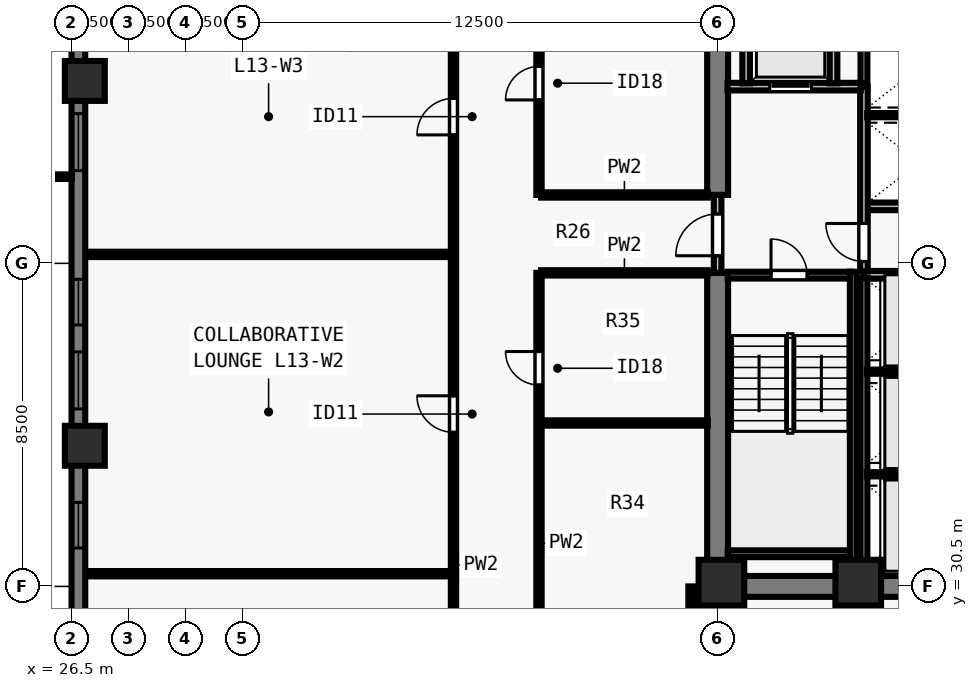
"""IFC4 building model, lengths in metres.
Left out: names, types, materials, properties, quantities, classifications, styles, units other than length and angle.
Written with IfcOpenShell. Run it as: python <this file> out.ifc"""

import sys

from ifc_helpers import new_model, si_unit, direction, frame, frame_2d, origin, origin_2d, place, context, subcontext, project, spatial, rectangle, extrude, element, fill, save


model = new_model("IFC4")
c1 = context("Model", 3, precision=1e-05, world=origin(), true_north=direction((0.0, 1.0)))
c2 = subcontext(c1, "Body", "Model", "MODEL_VIEW")
j1 = project(units=[si_unit("LENGTHUNIT", "METRE"), si_unit("PLANEANGLEUNIT", "RADIAN")], contexts=[c1])
p1 = place(None, origin())
s1 = spatial("IfcSite", under=j1, at=p1, CompositionType="ELEMENT")
p2 = place(p1, origin())
s2 = spatial("IfcBuilding", under=s1, at=p2, CompositionType="ELEMENT")
p3 = place(p2, frame((0.0, 0.0, 51.5)))
s3 = spatial("IfcBuildingStorey", under=s2, at=p3, CompositionType="ELEMENT", Elevation=51.5)
for number, where, z_axis, x_axis in (
    (1, (43.6, 30.6, 0.0), (0.0, 0.0, 1.0), (1.0, 0.0, 0.0)),
    (2, (47.2, 30.6, 0.0), (0.0, 0.0, 1.0), (1.0, 0.0, 0.0)),
):
    element("IfcColumn", number, at=place(p3, frame(where, z_axis=z_axis, x_axis=x_axis)), inside=s3, PredefinedType="COLUMN", context=c2, shape_type="SweptSolid", body=[
        extrude(rectangle(XDim=1.2, YDim=1.2, at=origin_2d()), origin(), (0.0, 0.0, 1.0), 3.5),
    ])
for number, where, z_axis, x_axis in (
    (3, (26.85, 43.8, 0.0), (0.0, 0.0, 1.0), (0.0, 1.0, 0.0)),
    (4, (26.85, 34.2, 0.0), (0.0, 0.0, 1.0), (0.0, 1.0, 0.0)),
):
    element("IfcColumn", number, at=place(p3, frame(where, z_axis=z_axis, x_axis=x_axis)), inside=s3, PredefinedType="COLUMN", context=c2, shape_type="SweptSolid", body=[
        extrude(rectangle(XDim=1.05, YDim=1.05, at=origin_2d()), origin(), (0.0, 0.0, 1.0), 3.5),
    ])
p4 = place(p3, frame((26.68, 16.5, 0.0), z_axis=(0.0, 0.0, 1.0), x_axis=(0.0, 1.0, 0.0)))
e5 = element("IfcWall", 5, at=p4, inside=s3, PredefinedType="SOLIDWALL", context=c2, shape_type="SweptSolid", body=[
    extrude(rectangle(XDim=44.662, YDim=0.36, at=frame_2d((22.331, 0.0))), origin(), (0.0, 0.0, 1.0), 3.28),
])
p5 = place(p4, frame((4.78, 0.0, 0.8)))
e6 = element("IfcOpeningElement", 6, at=p5, cuts=e5, PredefinedType="OPENING", context=c2, shape_type="SweptSolid", body=[
    extrude(rectangle(XDim=1.5, YDim=1.544, at=frame_2d((0.75, 0.772))), frame((0.0, 0.19, 0.0), z_axis=(0.0, -1.0, 0.0), x_axis=(1.0, 0.0, 0.0)), (0.0, 0.0, 1.0), 0.38),
])
p6 = place(p4, frame((8.29, 0.0, 0.8)))
e7 = element("IfcOpeningElement", 7, at=p6, cuts=e5, PredefinedType="OPENING", context=c2, shape_type="SweptSolid", body=[
    extrude(rectangle(XDim=1.2, YDim=1.544, at=frame_2d((0.6, 0.772))), frame((0.0, 0.19, 0.0), z_axis=(0.0, -1.0, 0.0), x_axis=(1.0, 0.0, 0.0)), (0.0, 0.0, 1.0), 0.38),
])
p7 = place(p4, frame((11.5, 0.0, 0.8)))
e8 = element("IfcOpeningElement", 8, at=p7, cuts=e5, PredefinedType="OPENING", context=c2, shape_type="SweptSolid", body=[
    extrude(rectangle(XDim=1.5, YDim=1.544, at=frame_2d((0.75, 0.772))), frame((0.0, 0.19, 0.0), z_axis=(0.0, -1.0, 0.0), x_axis=(1.0, 0.0, 0.0)), (0.0, 0.0, 1.0), 0.38),
])
p8 = place(p4, frame((15.01, 0.0, 0.8)))
e9 = element("IfcOpeningElement", 9, at=p8, cuts=e5, PredefinedType="OPENING", context=c2, shape_type="SweptSolid", body=[
    extrude(rectangle(XDim=1.2, YDim=1.544, at=frame_2d((0.6, 0.772))), frame((0.0, 0.19, 0.0), z_axis=(0.0, -1.0, 0.0), x_axis=(1.0, 0.0, 0.0)), (0.0, 0.0, 1.0), 0.38),
])
p9 = place(p4, frame((18.671, 0.0, 0.8)))
e10 = element("IfcOpeningElement", 10, at=p9, cuts=e5, PredefinedType="OPENING", context=c2, shape_type="SweptSolid", body=[
    extrude(rectangle(XDim=1.5, YDim=1.544, at=frame_2d((0.75, 0.772))), frame((0.0, 0.19, 0.0), z_axis=(0.0, -1.0, 0.0), x_axis=(1.0, 0.0, 0.0)), (0.0, 0.0, 1.0), 0.38),
])
p10 = place(p4, frame((20.881, 0.0, 0.8)))
e11 = element("IfcOpeningElement", 11, at=p10, cuts=e5, PredefinedType="OPENING", context=c2, shape_type="SweptSolid", body=[
    extrude(rectangle(XDim=1.2, YDim=1.544, at=frame_2d((0.6, 0.772))), frame((0.0, 0.19, 0.0), z_axis=(0.0, -1.0, 0.0), x_axis=(1.0, 0.0, 0.0)), (0.0, 0.0, 1.0), 0.38),
])
p11 = place(p4, frame((24.941, 0.0, 0.8)))
e12 = element("IfcOpeningElement", 12, at=p11, cuts=e5, PredefinedType="OPENING", context=c2, shape_type="SweptSolid", body=[
    extrude(rectangle(XDim=1.5, YDim=1.544, at=frame_2d((0.75, 0.772))), frame((0.0, 0.19, 0.0), z_axis=(0.0, -1.0, 0.0), x_axis=(1.0, 0.0, 0.0)), (0.0, 0.0, 1.0), 0.38),
])
p12 = place(p4, frame((28.451, 0.0, 0.8)))
e13 = element("IfcOpeningElement", 13, at=p12, cuts=e5, PredefinedType="OPENING", context=c2, shape_type="SweptSolid", body=[
    extrude(rectangle(XDim=1.2, YDim=1.544, at=frame_2d((0.6, 0.772))), frame((0.0, 0.19, 0.0), z_axis=(0.0, -1.0, 0.0), x_axis=(1.0, 0.0, 0.0)), (0.0, 0.0, 1.0), 0.38),
])
p13 = place(p4, frame((31.662, 0.0, 0.8)))
e14 = element("IfcOpeningElement", 14, at=p13, cuts=e5, PredefinedType="OPENING", context=c2, shape_type="SweptSolid", body=[
    extrude(rectangle(XDim=1.5, YDim=1.544, at=frame_2d((0.75, 0.772))), frame((0.0, 0.19, 0.0), z_axis=(0.0, -1.0, 0.0), x_axis=(1.0, 0.0, 0.0)), (0.0, 0.0, 1.0), 0.38),
])
p14 = place(p4, frame((35.172, 0.0, 0.8)))
e15 = element("IfcOpeningElement", 15, at=p14, cuts=e5, PredefinedType="OPENING", context=c2, shape_type="SweptSolid", body=[
    extrude(rectangle(XDim=1.2, YDim=1.544, at=frame_2d((0.6, 0.772))), frame((0.0, 0.19, 0.0), z_axis=(0.0, -1.0, 0.0), x_axis=(1.0, 0.0, 0.0)), (0.0, 0.0, 1.0), 0.38),
])
p15 = place(p4, frame((38.382, 0.0, 0.8)))
e16 = element("IfcOpeningElement", 16, at=p15, cuts=e5, PredefinedType="OPENING", context=c2, shape_type="SweptSolid", body=[
    extrude(rectangle(XDim=1.5, YDim=1.544, at=frame_2d((0.75, 0.772))), frame((0.0, 0.19, 0.0), z_axis=(0.0, -1.0, 0.0), x_axis=(1.0, 0.0, 0.0)), (0.0, 0.0, 1.0), 0.38),
])
p16 = place(p3, frame((43.225, 30.5, 0.0), z_axis=(0.0, 0.0, 1.0), x_axis=(1.0, 0.0, 0.0)))
e17 = element("IfcWall", 17, at=p16, inside=s3, PredefinedType="SHEAR", context=c2, shape_type="SweptSolid", body=[
    extrude(rectangle(XDim=17.55, YDim=0.55, at=frame_2d((8.775, 0.0))), origin(), (0.0, 0.0, 1.0), 3.28),
])
p17 = place(p3, frame((43.5, 30.765, 0.0), z_axis=(0.0, 0.0, 1.0), x_axis=(0.0, 1.0, 0.0)))
e18 = element("IfcWall", 18, at=p17, inside=s3, PredefinedType="SHEAR", context=c2, shape_type="SweptSolid", body=[
    extrude(rectangle(XDim=7.985, YDim=0.55, at=frame_2d((3.993, 0.0))), origin(), (0.0, 0.0, 1.0), 3.28),
])
p18 = place(p3, frame((43.5, 40.8, 0.0), z_axis=(0.0, 0.0, 1.0), x_axis=(0.0, 1.0, 0.0)))
e19 = element("IfcWall", 19, at=p18, inside=s3, PredefinedType="SHEAR", context=c2, shape_type="SweptSolid", body=[
    extrude(rectangle(XDim=6.435, YDim=0.55, at=frame_2d((3.218, 0.0))), origin(), (0.0, 0.0, 1.0), 3.28),
])
for number, where, z_axis, x_axis in (
    (20, (47.35, 38.7, 0.0), (0.0, 0.0, 1.0), (1.0, 0.0, 0.0)),
    (21, (47.35, 40.5, 0.0), (0.0, 0.0, 1.0), (1.0, 0.0, 0.0)),
):
    element("IfcWall", number, at=place(p3, frame(where, z_axis=z_axis, x_axis=x_axis)), inside=s3, PredefinedType="SOLIDWALL", context=c2, shape_type="SweptSolid", body=[
        extrude(rectangle(XDim=2.95, YDim=0.2, at=frame_2d((1.475, 0.0))), origin(), (0.0, 0.0, 1.0), 3.28),
    ])
p19 = place(p3, frame((43.5, 38.75, 0.0), z_axis=(0.0, 0.0, 1.0), x_axis=(0.0, 1.0, 0.0)))
e22 = element("IfcWall", 22, at=p19, inside=s3, PredefinedType="SOLIDWALL", context=c2, shape_type="SweptSolid", body=[
    extrude(rectangle(XDim=2.05, YDim=0.2, at=frame_2d((1.025, 0.0))), origin(), (0.0, 0.0, 1.0), 3.28),
])
p20 = place(p19, frame((0.45, 0.0, 0.0)))
e23 = element("IfcOpeningElement", 23, at=p20, cuts=e22, PredefinedType="OPENING", context=c2, shape_type="SweptSolid", body=[
    extrude(rectangle(XDim=1.1, YDim=2.15, at=frame_2d((0.55, 1.075))), frame((0.0, 0.11, 0.0), z_axis=(0.0, -1.0, 0.0), x_axis=(1.0, 0.0, 0.0)), (0.0, 0.0, 1.0), 0.22),
])
p21 = place(p3, frame((47.35, 38.785, 0.0), z_axis=(0.0, 0.0, 1.0), x_axis=(0.0, 1.0, 0.0)))
e24 = element("IfcWall", 24, at=p21, inside=s3, PredefinedType="SOLIDWALL", context=c2, shape_type="SweptSolid", body=[
    extrude(rectangle(XDim=4.865, YDim=0.2, at=frame_2d((2.433, 0.0))), origin(), (0.0, 0.0, 1.0), 3.28),
])
p22 = place(p21, frame((0.265, 0.0, 0.0)))
e25 = element("IfcOpeningElement", 25, at=p22, cuts=e24, PredefinedType="OPENING", context=c2, shape_type="SweptSolid", body=[
    extrude(rectangle(XDim=1.0, YDim=2.15, at=frame_2d((0.5, 1.075))), frame((0.0, 0.11, 0.0), z_axis=(0.0, -1.0, 0.0), x_axis=(1.0, 0.0, 0.0)), (0.0, 0.0, 1.0), 0.22),
])
p23 = place(p3, frame((43.76, 43.65, 0.0), z_axis=(0.0, 0.0, 1.0), x_axis=(1.0, 0.0, 0.0)))
e26 = element("IfcWall", 26, at=p23, inside=s3, PredefinedType="SOLIDWALL", context=c2, shape_type="SweptSolid", body=[
    extrude(rectangle(XDim=3.505, YDim=0.2, at=frame_2d((1.752, 0.0))), origin(), (0.0, 0.0, 1.0), 3.28),
])
p24 = place(p23, frame((1.11, 0.0, 0.0)))
e27 = element("IfcOpeningElement", 27, at=p24, cuts=e26, PredefinedType="OPENING", context=c2, shape_type="SweptSolid", body=[
    extrude(rectangle(XDim=1.1, YDim=2.2, at=frame_2d((0.55, 1.1))), frame((0.0, 0.11, 0.0), z_axis=(0.0, -1.0, 0.0), x_axis=(1.0, 0.0, 0.0)), (0.0, 0.0, 1.0), 0.22),
])
for number, where, z_axis, x_axis in (
    (28, (46.55, 43.735, 0.0), (0.0, 0.0, 1.0), (0.0, 1.0, 0.0)),
    (29, (44.25, 43.735, 0.0), (0.0, 0.0, 1.0), (0.0, 1.0, 0.0)),
):
    element("IfcWall", number, at=place(p3, frame(where, z_axis=z_axis, x_axis=x_axis)), inside=s3, PredefinedType="SOLIDWALL", context=c2, shape_type="SweptSolid", body=[
        extrude(rectangle(XDim=3.505, YDim=0.2, at=frame_2d((1.752, 0.0))), origin(), (0.0, 0.0, 1.0), 3.28),
    ])
p25 = place(p3, frame((47.35, 30.76, 0.0), z_axis=(0.0, 0.0, 1.0), x_axis=(0.0, 1.0, 0.0)))
e30 = element("IfcWall", 30, at=p25, inside=s3, PredefinedType="SOLIDWALL", context=c2, shape_type="SweptSolid", body=[
    extrude(rectangle(XDim=7.855, YDim=0.18, at=frame_2d((3.927, 0.0))), origin(), (0.0, 0.0, 1.0), 3.28),
])
for number, where, z_axis, x_axis in (
    (31, (47.425, 33.45, 0.0), (0.0, 0.0, 1.0), (1.0, 0.0, 0.0)),
    (32, (47.425, 36.15, 0.0), (0.0, 0.0, 1.0), (1.0, 0.0, 0.0)),
):
    element("IfcWall", number, at=place(p3, frame(where, z_axis=z_axis, x_axis=x_axis)), inside=s3, PredefinedType="PARTITIONING", context=c2, shape_type="SweptSolid", body=[
        extrude(rectangle(XDim=2.79, YDim=0.11, at=frame_2d((1.395, 0.0))), origin(), (0.0, 0.0, 1.0), 3.28),
    ])
p26 = place(p3, frame((47.35, 43.735, 0.0), z_axis=(0.0, 0.0, 1.0), x_axis=(0.0, 1.0, 0.0)))
e33 = element("IfcWall", 33, at=p26, inside=s3, PredefinedType="SOLIDWALL", context=c2, shape_type="SweptSolid", body=[
    extrude(rectangle(XDim=3.505, YDim=0.18, at=frame_2d((1.752, 0.0))), origin(), (0.0, 0.0, 1.0), 3.28),
])
p27 = place(p3, frame((47.435, 42.9, 0.0), z_axis=(0.0, 0.0, 1.0), x_axis=(1.0, 0.0, 0.0)))
e34 = element("IfcWall", 34, at=p27, inside=s3, PredefinedType="PARTITIONING", context=c2, shape_type="SweptSolid", body=[
    extrude(rectangle(XDim=2.78, YDim=0.11, at=frame_2d((1.39, 0.0))), origin(), (0.0, 0.0, 1.0), 3.28),
])
p28 = place(p3, frame((36.55, 23.305, 0.0), z_axis=(0.0, 0.0, 1.0), x_axis=(0.0, 1.0, 0.0)))
e35 = element("IfcWall", 35, at=p28, inside=s3, PredefinedType="PARTITIONING", context=c2, shape_type="SweptSolid", body=[
    extrude(rectangle(XDim=31.39, YDim=0.14, at=frame_2d((15.695, 0.0))), origin(), (0.0, 0.0, 1.0), 3.28),
])
p29 = place(p28, frame((3.307, 0.0, 0.0)))
e36 = element("IfcOpeningElement", 36, at=p29, cuts=e35, PredefinedType="OPENING", context=c2, shape_type="SweptSolid", body=[
    extrude(rectangle(XDim=0.96, YDim=2.12, at=frame_2d((0.48, 1.06))), frame((0.0, 0.08, 0.0), z_axis=(0.0, -1.0, 0.0), x_axis=(1.0, 0.0, 0.0)), (0.0, 0.0, 1.0), 0.16),
])
p30 = place(p28, frame((11.25, 0.0, 0.0)))
e37 = element("IfcOpeningElement", 37, at=p30, cuts=e35, PredefinedType="OPENING", context=c2, shape_type="SweptSolid", body=[
    extrude(rectangle(XDim=0.96, YDim=2.12, at=frame_2d((0.48, 1.06))), frame((0.0, 0.08, 0.0), z_axis=(0.0, -1.0, 0.0), x_axis=(1.0, 0.0, 0.0)), (0.0, 0.0, 1.0), 0.16),
])
p31 = place(p28, frame((19.075, 0.0, 0.0)))
e38 = element("IfcOpeningElement", 38, at=p31, cuts=e35, PredefinedType="OPENING", context=c2, shape_type="SweptSolid", body=[
    extrude(rectangle(XDim=0.96, YDim=2.12, at=frame_2d((0.48, 1.06))), frame((0.0, 0.08, 0.0), z_axis=(0.0, -1.0, 0.0), x_axis=(1.0, 0.0, 0.0)), (0.0, 0.0, 1.0), 0.16),
])
p32 = place(p28, frame((26.782, 0.0, 0.0)))
e39 = element("IfcOpeningElement", 39, at=p32, cuts=e35, PredefinedType="OPENING", context=c2, shape_type="SweptSolid", body=[
    extrude(rectangle(XDim=0.96, YDim=2.12, at=frame_2d((0.48, 1.06))), frame((0.0, 0.08, 0.0), z_axis=(0.0, -1.0, 0.0), x_axis=(1.0, 0.0, 0.0)), (0.0, 0.0, 1.0), 0.16),
])
p33 = place(p3, frame((38.8, 25.555, 0.0), z_axis=(0.0, 0.0, 1.0), x_axis=(0.0, 1.0, 0.0)))
e40 = element("IfcWall", 40, at=p33, inside=s3, PredefinedType="PARTITIONING", context=c2, shape_type="SweptSolid", body=[
    extrude(rectangle(XDim=13.195, YDim=0.14, at=frame_2d((6.598, 0.0))), origin(), (0.0, 0.0, 1.0), 3.28),
])
p34 = place(p33, frame((1.045, 0.0, 0.0)))
e41 = element("IfcOpeningElement", 41, at=p34, cuts=e40, PredefinedType="OPENING", context=c2, shape_type="SweptSolid", body=[
    extrude(rectangle(XDim=0.88, YDim=2.1, at=frame_2d((0.44, 1.05))), frame((0.0, 0.08, 0.0), z_axis=(0.0, -1.0, 0.0), x_axis=(1.0, 0.0, 0.0)), (0.0, 0.0, 1.0), 0.16),
])
p35 = place(p33, frame((10.245, 0.0, 0.0)))
e42 = element("IfcOpeningElement", 42, at=p35, cuts=e40, PredefinedType="OPENING", context=c2, shape_type="SweptSolid", body=[
    extrude(rectangle(XDim=0.88, YDim=2.1, at=frame_2d((0.44, 1.05))), frame((0.0, 0.08, 0.0), z_axis=(0.0, -1.0, 0.0), x_axis=(1.0, 0.0, 0.0)), (0.0, 0.0, 1.0), 0.16),
])
p36 = place(p3, frame((38.8, 40.8, 0.0), z_axis=(0.0, 0.0, 1.0), x_axis=(0.0, 1.0, 0.0)))
e43 = element("IfcWall", 43, at=p36, inside=s3, PredefinedType="PARTITIONING", context=c2, shape_type="SweptSolid", body=[
    extrude(rectangle(XDim=11.645, YDim=0.14, at=frame_2d((5.823, 0.0))), origin(), (0.0, 0.0, 1.0), 3.28),
])
p37 = place(p36, frame((2.5, 0.0, 0.0)))
e44 = element("IfcOpeningElement", 44, at=p37, cuts=e43, PredefinedType="OPENING", context=c2, shape_type="SweptSolid", body=[
    extrude(rectangle(XDim=0.88, YDim=2.1, at=frame_2d((0.44, 1.05))), frame((0.0, 0.08, 0.0), z_axis=(0.0, -1.0, 0.0), x_axis=(1.0, 0.0, 0.0)), (0.0, 0.0, 1.0), 0.16),
])
for number, where, z_axis, x_axis in (
    (45, (38.855, 38.75, 0.0), (0.0, 0.0, 1.0), (1.0, 0.0, 0.0)),
    (46, (38.855, 40.8, 0.0), (0.0, 0.0, 1.0), (1.0, 0.0, 0.0)),
):
    element("IfcWall", number, at=place(p3, frame(where, z_axis=z_axis, x_axis=x_axis)), inside=s3, PredefinedType="PARTITIONING", context=c2, shape_type="SweptSolid", body=[
        extrude(rectangle(XDim=4.385, YDim=0.14, at=frame_2d((2.192, 0.0))), origin(), (0.0, 0.0, 1.0), 3.28),
    ])
p38 = place(p3, frame((42.8, 25.555, 0.0), z_axis=(0.0, 0.0, 1.0), x_axis=(0.0, 1.0, 0.0)))
e47 = element("IfcWall", 47, at=p38, inside=s3, PredefinedType="PARTITIONING", context=c2, shape_type="SweptSolid", body=[
    extrude(rectangle(XDim=4.945, YDim=0.14, at=frame_2d((2.473, 0.0))), origin(), (0.0, 0.0, 1.0), 2.439),
])
p39 = place(p3, frame((38.855, 34.8, 0.0), z_axis=(0.0, 0.0, 1.0), x_axis=(1.0, 0.0, 0.0)))
e48 = element("IfcWall", 48, at=p39, inside=s3, PredefinedType="PARTITIONING", context=c2, shape_type="SweptSolid", body=[
    extrude(rectangle(XDim=4.385, YDim=0.14, at=frame_2d((2.192, 0.0))), origin(), (0.0, 0.0, 1.0), 3.28),
])
p40 = place(p3, frame((26.92, 30.834, 0.0), z_axis=(0.0, 0.0, 1.0), x_axis=(1.0, 0.0, 0.0)))
e49 = element("IfcWall", 49, at=p40, inside=s3, PredefinedType="PARTITIONING", context=c2, shape_type="SweptSolid", body=[
    extrude(rectangle(XDim=9.53, YDim=0.14, at=frame_2d((4.765, 0.0))), origin(), (0.0, 0.0, 1.0), 3.28),
])
p41 = place(p3, frame((26.92, 39.236, 0.0), z_axis=(0.0, 0.0, 1.0), x_axis=(1.0, 0.0, 0.0)))
e50 = element("IfcWall", 50, at=p41, inside=s3, PredefinedType="PARTITIONING", context=c2, shape_type="SweptSolid", body=[
    extrude(rectangle(XDim=9.53, YDim=0.14, at=frame_2d((4.765, 0.0))), origin(), (0.0, 0.0, 1.0), 2.849),
])
p42 = place(p3, frame((43.765, 38.69, 0.0), z_axis=(0.0, 0.0, 1.0), x_axis=(1.0, 0.0, 0.0)))
e51 = element("IfcWall", 51, at=p42, inside=s3, PredefinedType="SOLIDWALL", context=c2, shape_type="SweptSolid", body=[
    extrude(rectangle(XDim=3.23, YDim=0.18, at=frame_2d((1.615, 0.0))), origin(), (0.0, 0.0, 1.0), 3.28),
])
p43 = place(p42, frame((1.14, 0.0, 0.0)))
e52 = element("IfcOpeningElement", 52, at=p43, cuts=e51, PredefinedType="OPENING", context=c2, shape_type="SweptSolid", body=[
    extrude(rectangle(XDim=0.95, YDim=2.15, at=frame_2d((0.475, 1.075))), frame((0.0, 0.1, 0.0), z_axis=(0.0, -1.0, 0.0), x_axis=(1.0, 0.0, 0.0)), (0.0, 0.0, 1.0), 0.2),
])
p44 = place(p3, frame((43.765, 31.36, 0.0), z_axis=(0.0, 0.0, 1.0), x_axis=(1.0, 0.0, 0.0)))
e53 = element("IfcWall", 53, at=p44, inside=s3, PredefinedType="SOLIDWALL", context=c2, shape_type="SweptSolid", body=[
    extrude(rectangle(XDim=3.23, YDim=0.18, at=frame_2d((1.615, 0.0))), origin(), (0.0, 0.0, 1.0), 3.28),
])
p45 = place(p3, frame((47.07, 38.78, 0.0), z_axis=(0.0, 0.0, 1.0), x_axis=(0.0, -1.0, 0.0)))
e54 = element("IfcWall", 54, at=p45, inside=s3, PredefinedType="SOLIDWALL", context=c2, shape_type="SweptSolid", body=[
    extrude(rectangle(XDim=8.017, YDim=0.18, at=frame_2d((4.009, 0.0))), origin(), (0.0, 0.0, 1.0), 3.28),
])
p46 = place(p8, origin())
e55 = element("IfcWindow", 55, at=p46, inside=s3, PartitioningType="SINGLE_PANEL", PredefinedType="WINDOW", context=c2, shape_type="SweptSolid", body=[
    extrude(rectangle(XDim=1.2, YDim=1.544, at=frame_2d((0.6, 0.772))), frame((0.0, -0.05, 0.0), z_axis=(0.0, -1.0, 0.0), x_axis=(1.0, 0.0, 0.0)), (0.0, 0.0, 1.0), 0.06),
])
fill(e9, e55)
p47 = place(p9, origin())
e56 = element("IfcWindow", 56, at=p47, inside=s3, PartitioningType="SINGLE_PANEL", PredefinedType="WINDOW", context=c2, shape_type="SweptSolid", body=[
    extrude(rectangle(XDim=1.5, YDim=1.544, at=frame_2d((0.75, 0.772))), frame((0.0, -0.05, 0.0), z_axis=(0.0, -1.0, 0.0), x_axis=(1.0, 0.0, 0.0)), (0.0, 0.0, 1.0), 0.06),
])
fill(e10, e56)
p48 = place(p10, origin())
e57 = element("IfcWindow", 57, at=p48, inside=s3, PartitioningType="SINGLE_PANEL", PredefinedType="WINDOW", context=c2, shape_type="SweptSolid", body=[
    extrude(rectangle(XDim=1.2, YDim=1.544, at=frame_2d((0.6, 0.772))), frame((0.0, -0.05, 0.0), z_axis=(0.0, -1.0, 0.0), x_axis=(1.0, 0.0, 0.0)), (0.0, 0.0, 1.0), 0.06),
])
fill(e11, e57)
p49 = place(p11, origin())
e58 = element("IfcWindow", 58, at=p49, inside=s3, PartitioningType="SINGLE_PANEL", PredefinedType="WINDOW", context=c2, shape_type="SweptSolid", body=[
    extrude(rectangle(XDim=1.5, YDim=1.544, at=frame_2d((0.75, 0.772))), frame((0.0, -0.05, 0.0), z_axis=(0.0, -1.0, 0.0), x_axis=(1.0, 0.0, 0.0)), (0.0, 0.0, 1.0), 0.06),
])
fill(e12, e58)
p50 = place(p20, origin())
e59 = element("IfcDoor", 59, at=p50, inside=s3, OperationType="SINGLE_SWING_LEFT", PredefinedType="DOOR", context=c2, shape_type="SweptSolid", body=[
    extrude(rectangle(XDim=1.1, YDim=2.15, at=frame_2d((0.55, 1.075))), frame((0.0, 0.025, 0.0), z_axis=(0.0, -1.0, 0.0), x_axis=(1.0, 0.0, 0.0)), (0.0, 0.0, 1.0), 0.05),
])
fill(e23, e59)
p51 = place(p22, origin())
e60 = element("IfcDoor", 60, at=p51, inside=s3, OperationType="SINGLE_SWING_RIGHT", PredefinedType="DOOR", context=c2, shape_type="SweptSolid", body=[
    extrude(rectangle(XDim=1.0, YDim=2.15, at=frame_2d((0.5, 1.075))), frame((0.0, 0.025, 0.0), z_axis=(0.0, -1.0, 0.0), x_axis=(1.0, 0.0, 0.0)), (0.0, 0.0, 1.0), 0.05),
])
fill(e25, e60)
p52 = place(p24, origin())
e61 = element("IfcDoor", 61, at=p52, inside=s3, OperationType="SLIDING_TO_LEFT", PredefinedType="DOOR", context=c2, shape_type="SweptSolid", body=[
    extrude(rectangle(XDim=1.1, YDim=2.2, at=frame_2d((0.55, 1.1))), frame((0.0, 0.025, 0.0), z_axis=(0.0, -1.0, 0.0), x_axis=(1.0, 0.0, 0.0)), (0.0, 0.0, 1.0), 0.05),
])
fill(e27, e61)
p53 = place(p35, origin())
e62 = element("IfcDoor", 62, at=p53, inside=s3, OperationType="SINGLE_SWING_RIGHT", PredefinedType="DOOR", context=c2, shape_type="SweptSolid", body=[
    extrude(rectangle(XDim=0.88, YDim=2.1, at=frame_2d((0.44, 1.05))), frame((0.0, 0.025, 0.0), z_axis=(0.0, -1.0, 0.0), x_axis=(1.0, 0.0, 0.0)), (0.0, 0.0, 1.0), 0.05),
])
fill(e42, e62)
p54 = place(p37, origin())
e63 = element("IfcDoor", 63, at=p54, inside=s3, OperationType="SINGLE_SWING_LEFT", PredefinedType="DOOR", context=c2, shape_type="SweptSolid", body=[
    extrude(rectangle(XDim=0.88, YDim=2.1, at=frame_2d((0.44, 1.05))), frame((0.0, 0.025, 0.0), z_axis=(0.0, -1.0, 0.0), x_axis=(1.0, 0.0, 0.0)), (0.0, 0.0, 1.0), 0.05),
])
fill(e44, e63)
p55 = place(p30, origin())
e64 = element("IfcDoor", 64, at=p55, inside=s3, OperationType="SINGLE_SWING_RIGHT", PredefinedType="DOOR", context=c2, shape_type="SweptSolid", body=[
    extrude(rectangle(XDim=0.96, YDim=2.12, at=frame_2d((0.48, 1.06))), frame((0.0, 0.025, 0.0), z_axis=(0.0, -1.0, 0.0), x_axis=(1.0, 0.0, 0.0)), (0.0, 0.0, 1.0), 0.05),
])
fill(e37, e64)
p56 = place(p31, origin())
e65 = element("IfcDoor", 65, at=p56, inside=s3, OperationType="SINGLE_SWING_LEFT", PredefinedType="DOOR", context=c2, shape_type="SweptSolid", body=[
    extrude(rectangle(XDim=0.96, YDim=2.12, at=frame_2d((0.48, 1.06))), frame((0.0, 0.025, 0.0), z_axis=(0.0, -1.0, 0.0), x_axis=(1.0, 0.0, 0.0)), (0.0, 0.0, 1.0), 0.05),
])
fill(e38, e65)
p57 = place(p43, origin())
e66 = element("IfcDoor", 66, at=p57, inside=s3, OperationType="SINGLE_SWING_LEFT", PredefinedType="DOOR", context=c2, shape_type="SweptSolid", body=[
    extrude(rectangle(XDim=0.95, YDim=2.15, at=frame_2d((0.475, 1.075))), frame((0.0, 0.025, 0.0), z_axis=(0.0, -1.0, 0.0), x_axis=(1.0, 0.0, 0.0)), (0.0, 0.0, 1.0), 0.05),
])
fill(e52, e66)
save(model, sys.argv[1])
